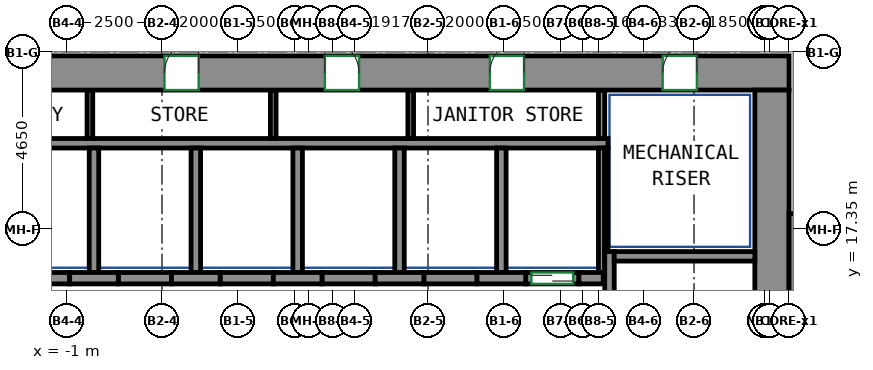
"""IFC4 building model, lengths in metres.
Left out: names, types, materials, properties, quantities, classifications, styles, units other than length and angle.
Written with IfcOpenShell. Run it as: python <this file> out.ifc"""

import sys

from ifc_helpers import new_model, si_unit, direction, frame, frame_2d, origin, place, context, subcontext, project, spatial, rectangle, extrude, source, transform, mapped, element, fill, save


model = new_model("IFC4")
c1 = context("Model", 3, precision=1e-05, world=origin(), true_north=direction((0.0, 1.0)))
c2 = subcontext(c1, "Body", "Model", "MODEL_VIEW")
j1 = project(units=[si_unit("LENGTHUNIT", "METRE"), si_unit("PLANEANGLEUNIT", "RADIAN")], contexts=[c1])
p1 = place(None, origin())
s1 = spatial("IfcSite", under=j1, at=p1, CompositionType="ELEMENT")
p2 = place(p1, origin())
s2 = spatial("IfcBuilding", under=s1, at=p2, CompositionType="ELEMENT")
p3 = place(p2, frame((0.0, 0.0, 108.6)))
s3 = spatial("IfcBuildingStorey", under=s2, at=p3, CompositionType="ELEMENT", Elevation=108.6)
m1 = source(origin(), c2, "Body", "SweptSolid", [
    extrude(rectangle(XDim=33.9, YDim=0.9, at=frame_2d((16.95, 0.0))), origin(), (0.0, 0.0, 1.0), 3.72),
])
p4 = place(p3, frame((-15.9, 21.45, 0.0), z_axis=(0.0, 0.0, 1.0), x_axis=(1.0, 0.0, 0.0)))
e1 = element("IfcWall", 1, at=p4, inside=s3, PredefinedType="SHEAR", context=c2, shape_type="MappedRepresentation", body=[
    mapped(m1, transform((0.0, 0.0, 0.0))),
])
p5 = place(p4, frame((7.12, 0.0, 0.0)))
e2 = element("IfcOpeningElement", 2, at=p5, cuts=e1, PredefinedType="OPENING", context=c2, shape_type="SweptSolid", body=[
    extrude(rectangle(XDim=0.9, YDim=2.1, at=frame_2d((0.45, 1.05))), frame((0.0, 0.46, 0.0), z_axis=(0.0, -1.0, 0.0), x_axis=(1.0, 0.0, 0.0)), (0.0, 0.0, 1.0), 0.92),
])
p6 = place(p4, frame((12.427, 0.0, 0.0)))
e3 = element("IfcOpeningElement", 3, at=p6, cuts=e1, PredefinedType="OPENING", context=c2, shape_type="SweptSolid", body=[
    extrude(rectangle(XDim=0.9, YDim=2.1, at=frame_2d((0.45, 1.05))), frame((0.0, 0.46, 0.0), z_axis=(0.0, -1.0, 0.0), x_axis=(1.0, 0.0, 0.0)), (0.0, 0.0, 1.0), 0.92),
])
p7 = place(p4, frame((17.465, 0.0, 0.0)))
e4 = element("IfcOpeningElement", 4, at=p7, cuts=e1, PredefinedType="OPENING", context=c2, shape_type="SweptSolid", body=[
    extrude(rectangle(XDim=0.9, YDim=2.1, at=frame_2d((0.45, 1.05))), frame((0.0, 0.46, 0.0), z_axis=(0.0, -1.0, 0.0), x_axis=(1.0, 0.0, 0.0)), (0.0, 0.0, 1.0), 0.92),
])
p8 = place(p4, frame((21.686, 0.0, 0.0)))
e5 = element("IfcOpeningElement", 5, at=p8, cuts=e1, PredefinedType="OPENING", context=c2, shape_type="SweptSolid", body=[
    extrude(rectangle(XDim=0.9, YDim=2.1, at=frame_2d((0.45, 1.05))), frame((0.0, 0.46, 0.0), z_axis=(0.0, -1.0, 0.0), x_axis=(1.0, 0.0, 0.0)), (0.0, 0.0, 1.0), 0.92),
])
p9 = place(p4, frame((26.027, 0.0, 0.0)))
e6 = element("IfcOpeningElement", 6, at=p9, cuts=e1, PredefinedType="OPENING", context=c2, shape_type="SweptSolid", body=[
    extrude(rectangle(XDim=0.9, YDim=2.1, at=frame_2d((0.45, 1.05))), frame((0.0, 0.46, 0.0), z_axis=(0.0, -1.0, 0.0), x_axis=(1.0, 0.0, 0.0)), (0.0, 0.0, 1.0), 0.92),
])
p10 = place(p4, frame((2.425, 0.0, 0.0)))
e7 = element("IfcOpeningElement", 7, at=p10, cuts=e1, PredefinedType="OPENING", context=c2, shape_type="SweptSolid", body=[
    extrude(rectangle(XDim=0.9, YDim=2.1, at=frame_2d((0.45, 1.05))), frame((0.0, 0.46, 0.0), z_axis=(0.0, -1.0, 0.0), x_axis=(1.0, 0.0, 0.0)), (0.0, 0.0, 1.0), 0.92),
])
p11 = place(p4, frame((30.575, 0.0, 0.0)))
e8 = element("IfcOpeningElement", 8, at=p11, cuts=e1, PredefinedType="OPENING", context=c2, shape_type="SweptSolid", body=[
    extrude(rectangle(XDim=0.9, YDim=2.1, at=frame_2d((0.45, 1.05))), frame((0.0, 0.46, 0.0), z_axis=(0.0, -1.0, 0.0), x_axis=(1.0, 0.0, 0.0)), (0.0, 0.0, 1.0), 0.92),
])
m2 = source(origin(), c2, "Body", "SweptSolid", [
    extrude(rectangle(XDim=12.0, YDim=0.9, at=frame_2d((6.0, 0.0))), origin(), (0.0, 0.0, 1.0), 3.72),
])
p12 = place(p3, frame((17.55, 9.0, 0.0), z_axis=(0.0, 0.0, 1.0), x_axis=(0.0, 1.0, 0.0)))
e9 = element("IfcWall", 9, at=p12, inside=s3, PredefinedType="SHEAR", context=c2, shape_type="MappedRepresentation", body=[
    mapped(m2, transform((0.0, 0.0, 0.0))),
])
m3 = source(origin(), c2, "Body", "SweptSolid", [
    extrude(rectangle(XDim=7.75, YDim=0.25, at=frame_2d((3.875, 0.0))), origin(), (0.0, 0.0, 1.0), 3.72),
])
p13 = place(p3, frame((13.275, 9.0, 0.0), z_axis=(0.0, 0.0, 1.0), x_axis=(0.0, 1.0, 0.0)))
e10 = element("IfcWall", 10, at=p13, inside=s3, PredefinedType="SHEAR", context=c2, shape_type="MappedRepresentation", body=[
    mapped(m3, transform((0.0, 0.0, 0.0))),
])
m4 = source(origin(), c2, "Body", "SweptSolid", [
    extrude(rectangle(XDim=3.7, YDim=0.25, at=frame_2d((1.85, 0.0))), origin(), (0.0, 0.0, 1.0), 3.72),
])
p14 = place(p3, frame((13.4, 16.625, 0.0), z_axis=(0.0, 0.0, 1.0), x_axis=(1.0, 0.0, 0.0)))
e11 = element("IfcWall", 11, at=p14, inside=s3, PredefinedType="SHEAR", context=c2, shape_type="MappedRepresentation", body=[
    mapped(m4, transform((0.0, 0.0, 0.0))),
])
m5 = source(origin(), c2, "Body", "SweptSolid", [
    extrude(rectangle(XDim=8.0, YDim=0.35, at=frame_2d((4.0, 0.0))), origin(), (0.0, 0.0, 1.0), 3.72),
])
p15 = place(p3, frame((18.175, 9.75, 0.0), z_axis=(0.0, 0.0, 1.0), x_axis=(0.0, 1.0, 0.0)))
e12 = element("IfcWall", 12, at=p15, inside=s3, PredefinedType="SHEAR", context=c2, shape_type="MappedRepresentation", body=[
    mapped(m5, transform((0.0, 0.0, 0.0))),
])
m6 = source(origin(), c2, "Body", "SweptSolid", [
    extrude(rectangle(XDim=1.28, YDim=0.3, at=frame_2d((0.64, 0.0))), origin(), (0.0, 0.0, 1.0), 3.72),
])
for number, where, z_axis, x_axis in (
    (13, (-0.93, 16.05, 0.0), (0.0, 0.0, 1.0), (1.0, 0.0, 0.0)),
    (14, (1.75, 16.05, 0.0), (0.0, 0.0, 1.0), (1.0, 0.0, 0.0)),
    (15, (4.43, 16.05, 0.0), (0.0, 0.0, 1.0), (1.0, 0.0, 0.0)),
):
    element("IfcWall", number, at=place(p3, frame(where, z_axis=z_axis, x_axis=x_axis)), inside=s3, PredefinedType="SHEAR", context=c2, shape_type="MappedRepresentation", body=[
        mapped(m6, transform((0.0, 0.0, 0.0))),
    ])
m7 = source(origin(), c2, "Body", "SweptSolid", [
    extrude(rectangle(XDim=1.28, YDim=0.3, at=frame_2d((0.64, 0.0))), origin(), (0.0, 0.0, 1.0), 3.72),
])
p16 = place(p3, frame((7.11, 16.05, 0.0), z_axis=(0.0, 0.0, 1.0), x_axis=(1.0, 0.0, 0.0)))
e16 = element("IfcWall", 16, at=p16, inside=s3, PredefinedType="SHEAR", context=c2, shape_type="MappedRepresentation", body=[
    mapped(m7, transform((0.0, 0.0, 0.0))),
])
p17 = place(p3, frame((9.79, 16.05, 0.0), z_axis=(0.0, 0.0, 1.0), x_axis=(1.0, 0.0, 0.0)))
e17 = element("IfcWall", 17, at=p17, inside=s3, PredefinedType="SHEAR", context=c2, shape_type="MappedRepresentation", body=[
    mapped(m6, transform((0.0, 0.0, 0.0))),
])
m8 = source(origin(), c2, "Body", "SweptSolid", [
    extrude(rectangle(XDim=0.64, YDim=0.3, at=frame_2d((0.32, 0.0))), origin(), (0.0, 0.0, 1.0), 3.72),
])
p18 = place(p3, frame((12.47, 16.05, 0.0), z_axis=(0.0, 0.0, 1.0), x_axis=(1.0, 0.0, 0.0)))
e18 = element("IfcWall", 18, at=p18, inside=s3, PredefinedType="SHEAR", context=c2, shape_type="MappedRepresentation", body=[
    mapped(m8, transform((0.0, 0.0, 0.0))),
])
m9 = source(origin(), c2, "Body", "SweptSolid", [
    extrude(rectangle(XDim=1.4, YDim=0.3, at=frame_2d((0.7, 0.0))), origin(), (0.0, 0.0, 1.0), 3.72),
])
p19 = place(p3, frame((11.07, 16.05, 0.0), z_axis=(0.0, 0.0, 1.0), x_axis=(1.0, 0.0, 0.0)))
e19 = element("IfcWall", 19, at=p19, inside=s3, PredefinedType="PARTITIONING", context=c2, shape_type="MappedRepresentation", body=[
    mapped(m9, transform((0.0, 0.0, 0.0))),
])
p20 = place(p19, frame((0.15, 0.0, 0.0)))
e20 = element("IfcOpeningElement", 20, at=p20, cuts=e19, PredefinedType="OPENING", context=c2, shape_type="SweptSolid", body=[
    extrude(rectangle(XDim=1.1, YDim=2.1, at=frame_2d((0.55, 1.05))), frame((0.0, 0.16, 0.0), z_axis=(0.0, -1.0, 0.0), x_axis=(1.0, 0.0, 0.0)), (0.0, 0.0, 1.0), 0.32),
])
m10 = source(origin(), c2, "Body", "SweptSolid", [
    extrude(rectangle(XDim=1.4, YDim=0.3, at=frame_2d((0.7, 0.0))), origin(), (0.0, 0.0, 1.0), 3.72),
])
p21 = place(p3, frame((-2.33, 16.05, 0.0), z_axis=(0.0, 0.0, 1.0), x_axis=(1.0, 0.0, 0.0)))
e21 = element("IfcWall", 21, at=p21, inside=s3, PredefinedType="PARTITIONING", context=c2, shape_type="MappedRepresentation", body=[
    mapped(m10, transform((0.0, 0.0, 0.0))),
])
for number, where, z_axis, x_axis in (
    (22, (0.35, 16.05, 0.0), (0.0, 0.0, 1.0), (1.0, 0.0, 0.0)),
    (23, (3.03, 16.05, 0.0), (0.0, 0.0, 1.0), (1.0, 0.0, 0.0)),
):
    element("IfcWall", number, at=place(p3, frame(where, z_axis=z_axis, x_axis=x_axis)), inside=s3, PredefinedType="PARTITIONING", context=c2, shape_type="MappedRepresentation", body=[
        mapped(m9, transform((0.0, 0.0, 0.0))),
    ])
for number, where, z_axis, x_axis in (
    (24, (5.71, 16.05, 0.0), (0.0, 0.0, 1.0), (1.0, 0.0, 0.0)),
    (25, (8.39, 16.05, 0.0), (0.0, 0.0, 1.0), (1.0, 0.0, 0.0)),
):
    element("IfcWall", number, at=place(p3, frame(where, z_axis=z_axis, x_axis=x_axis)), inside=s3, PredefinedType="PARTITIONING", context=c2, shape_type="MappedRepresentation", body=[
        mapped(m10, transform((0.0, 0.0, 0.0))),
    ])
m11 = source(origin(), c2, "Body", "SweptSolid", [
    extrude(rectangle(XDim=19.01, YDim=0.25, at=frame_2d((9.505, 0.0))), origin(), (0.0, 0.0, 1.0), 3.72),
])
p22 = place(p3, frame((-5.775, 19.6, 0.0), z_axis=(0.0, 0.0, 1.0), x_axis=(1.0, 0.0, 0.0)))
e26 = element("IfcWall", 26, at=p22, inside=s3, PredefinedType="PARTITIONING", context=c2, shape_type="MappedRepresentation", body=[
    mapped(m11, transform((0.0, 0.0, 0.0))),
])
m12 = source(origin(), c2, "Body", "SweptSolid", [
    extrude(rectangle(XDim=3.275, YDim=0.165, at=frame_2d((1.638, 0.0))), origin(), (0.0, 0.0, 1.0), 3.72),
])
p23 = place(p3, frame((13.067, 16.2, 0.0), z_axis=(0.0, 0.0, 1.0), x_axis=(0.0, 1.0, 0.0)))
e27 = element("IfcWall", 27, at=p23, inside=s3, PredefinedType="PARTITIONING", context=c2, shape_type="MappedRepresentation", body=[
    mapped(m12, transform((0.0, 0.0, 0.0))),
])
m13 = source(origin(), c2, "Body", "SweptSolid", [
    extrude(rectangle(XDim=1.275, YDim=0.165, at=frame_2d((0.637, 0.0))), origin(), (0.0, 0.0, 1.0), 3.72),
])
p24 = place(p3, frame((13.067, 19.725, 0.0), z_axis=(0.0, 0.0, 1.0), x_axis=(0.0, 1.0, 0.0)))
e28 = element("IfcWall", 28, at=p24, inside=s3, PredefinedType="PARTITIONING", context=c2, shape_type="MappedRepresentation", body=[
    mapped(m13, transform((0.0, 0.0, 0.0))),
])
m14 = source(origin(), c2, "Body", "SweptSolid", [
    extrude(rectangle(XDim=3.275, YDim=0.25, at=frame_2d((1.638, 0.0))), origin(), (0.0, 0.0, 1.0), 3.72),
])
p25 = place(p3, frame((10.43, 16.2, 0.0), z_axis=(0.0, 0.0, 1.0), x_axis=(0.0, 1.0, 0.0)))
e29 = element("IfcWall", 29, at=p25, inside=s3, PredefinedType="PARTITIONING", context=c2, shape_type="MappedRepresentation", body=[
    mapped(m14, transform((0.0, 0.0, 0.0))),
])
m15 = source(origin(), c2, "Body", "SweptSolid", [
    extrude(rectangle(XDim=2.725, YDim=0.085, at=frame_2d((1.363, 0.0))), origin(), (0.0, 0.0, 1.0), 3.72),
])
p26 = place(p3, frame((13.192, 16.75, 0.0), z_axis=(0.0, 0.0, 1.0), x_axis=(0.0, 1.0, 0.0)))
e30 = element("IfcWall", 30, at=p26, inside=s3, PredefinedType="PARTITIONING", context=c2, shape_type="MappedRepresentation", body=[
    mapped(m15, transform((0.0, 0.0, 0.0))),
])
for number, where, z_axis, x_axis in (
    (31, (2.39, 16.2, 0.0), (0.0, 0.0, 1.0), (0.0, 1.0, 0.0)),
    (32, (5.07, 16.2, 0.0), (0.0, 0.0, 1.0), (0.0, 1.0, 0.0)),
    (33, (7.75, 16.2, 0.0), (0.0, 0.0, 1.0), (0.0, 1.0, 0.0)),
    (34, (-0.29, 16.2, 0.0), (0.0, 0.0, 1.0), (0.0, 1.0, 0.0)),
):
    element("IfcWall", number, at=place(p3, frame(where, z_axis=z_axis, x_axis=x_axis)), inside=s3, PredefinedType="PARTITIONING", context=c2, shape_type="MappedRepresentation", body=[
        mapped(m14, transform((0.0, 0.0, 0.0))),
    ])
m16 = source(origin(), c2, "Body", "SweptSolid", [
    extrude(rectangle(XDim=1.275, YDim=0.15, at=frame_2d((0.637, 0.0))), origin(), (0.0, 0.0, 1.0), 3.72),
])
for number, where, z_axis, x_axis in (
    (35, (-0.397, 19.725, 0.0), (0.0, 0.0, 1.0), (0.0, 1.0, 0.0)),
    (36, (4.427, 19.725, 0.0), (0.0, 0.0, 1.0), (0.0, 1.0, 0.0)),
    (37, (8.045, 19.725, 0.0), (0.0, 0.0, 1.0), (0.0, 1.0, 0.0)),
):
    element("IfcWall", number, at=place(p3, frame(where, z_axis=z_axis, x_axis=x_axis)), inside=s3, PredefinedType="PARTITIONING", context=c2, shape_type="MappedRepresentation", body=[
        mapped(m16, transform((0.0, 0.0, 0.0))),
    ])
p27 = place(p20, origin())
e38 = element("IfcDoor", 38, at=p27, inside=s3, OperationType="DOUBLE_DOOR_SLIDING", PredefinedType="DOOR", context=c2, shape_type="SweptSolid", body=[
    extrude(rectangle(XDim=1.1, YDim=2.1, at=frame_2d((0.55, 1.05))), frame((0.0, 0.025, 0.0), z_axis=(0.0, -1.0, 0.0), x_axis=(1.0, 0.0, 0.0)), (0.0, 0.0, 1.0), 0.05),
])
fill(e20, e38)
p28 = place(p7, origin())
e39 = element("IfcDoor", 39, at=p28, inside=s3, OperationType="SINGLE_SWING_RIGHT", PredefinedType="DOOR", context=c2, shape_type="SweptSolid", body=[
    extrude(rectangle(XDim=0.9, YDim=2.1, at=frame_2d((0.45, 1.05))), frame((0.0, -0.305, 0.0), z_axis=(0.0, -1.0, 0.0), x_axis=(1.0, 0.0, 0.0)), (0.0, 0.0, 1.0), 0.05),
])
fill(e4, e39)
p29 = place(p8, origin())
e40 = element("IfcDoor", 40, at=p29, inside=s3, OperationType="SINGLE_SWING_LEFT", PredefinedType="DOOR", context=c2, shape_type="SweptSolid", body=[
    extrude(rectangle(XDim=0.9, YDim=2.1, at=frame_2d((0.45, 1.05))), frame((0.0, -0.305, 0.0), z_axis=(0.0, -1.0, 0.0), x_axis=(1.0, 0.0, 0.0)), (0.0, 0.0, 1.0), 0.05),
])
fill(e5, e40)
p30 = place(p9, origin())
e41 = element("IfcDoor", 41, at=p30, inside=s3, OperationType="SINGLE_SWING_RIGHT", PredefinedType="DOOR", context=c2, shape_type="SweptSolid", body=[
    extrude(rectangle(XDim=0.9, YDim=2.1, at=frame_2d((0.45, 1.05))), frame((0.0, -0.305, 0.0), z_axis=(0.0, -1.0, 0.0), x_axis=(1.0, 0.0, 0.0)), (0.0, 0.0, 1.0), 0.05),
])
fill(e6, e41)
p31 = place(p11, origin())
e42 = element("IfcDoor", 42, at=p31, inside=s3, OperationType="SINGLE_SWING_RIGHT", PredefinedType="DOOR", context=c2, shape_type="SweptSolid", body=[
    extrude(rectangle(XDim=0.9, YDim=2.1, at=frame_2d((0.45, 1.05))), frame((0.0, -0.305, 0.0), z_axis=(0.0, -1.0, 0.0), x_axis=(1.0, 0.0, 0.0)), (0.0, 0.0, 1.0), 0.05),
])
fill(e8, e42)
save(model, sys.argv[1])
